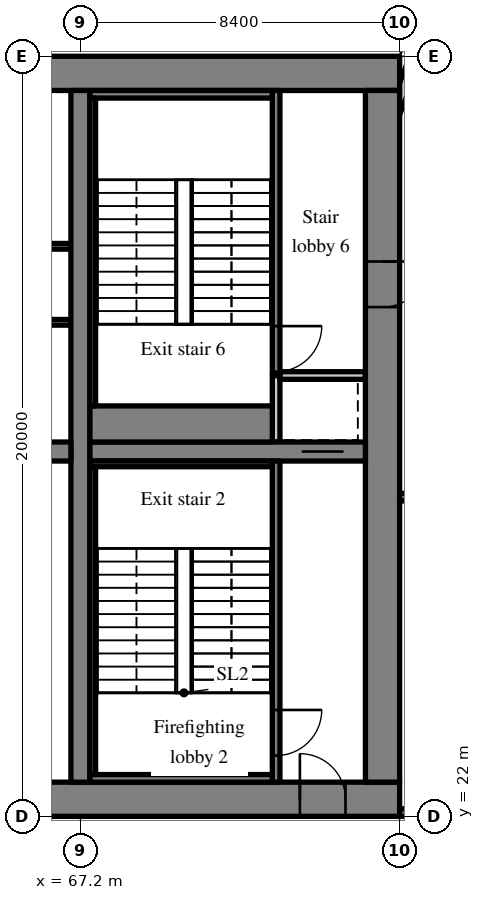
"""IFC4 building model, lengths in metres.
Left out: names, types, materials, properties, quantities, classifications, styles, units other than length and angle.
Written with IfcOpenShell. Run it as: python <this file> out.ifc"""

import sys

from ifc_helpers import new_model, si_unit, direction, frame, frame_2d, origin, place, context, subcontext, project, spatial, rectangle, extrude, source, transform, mapped, element, fill, save


model = new_model("IFC4")
c1 = context("Model", 3, precision=1e-05, world=origin(), true_north=direction((0.0, 1.0)))
c2 = subcontext(c1, "Body", "Model", "MODEL_VIEW")
j1 = project(units=[si_unit("LENGTHUNIT", "METRE"), si_unit("PLANEANGLEUNIT", "RADIAN")], contexts=[c1])
p1 = place(None, origin())
s1 = spatial("IfcSite", under=j1, at=p1, CompositionType="ELEMENT")
p2 = place(p1, origin())
s2 = spatial("IfcBuilding", under=s1, at=p2, CompositionType="ELEMENT")
p3 = place(p2, frame((0.0, 0.0, 99.0)))
s3 = spatial("IfcBuildingStorey", under=s2, at=p3, CompositionType="ELEMENT", Elevation=99.0)
m1 = source(origin(), c2, "Body", "SweptSolid", [
    extrude(rectangle(XDim=50.4, YDim=0.9, at=frame_2d((25.2, 0.0))), origin(), (0.0, 0.0, 1.0), 3.52),
])
p4 = place(p3, frame((25.2, 22.45, 0.0), z_axis=(0.0, 0.0, 1.0), x_axis=(1.0, 0.0, 0.0)))
e1 = element("IfcWall", 1, at=p4, inside=s3, PredefinedType="SHEAR", context=c2, shape_type="MappedRepresentation", body=[
    mapped(m1, transform((0.0, 0.0, 0.0), scale=1.0)),
])
m2 = source(origin(), c2, "Body", "SweptSolid", [
    extrude(rectangle(XDim=1.8, YDim=2.1, at=frame_2d((0.9, 1.05))), frame((0.0, 0.46, 0.0), z_axis=(0.0, -1.0, 0.0), x_axis=(1.0, 0.0, 0.0)), (0.0, 0.0, 1.0), 0.92),
])
p5 = place(p4, frame((15.9, 0.0, 0.0)))
e2 = element("IfcOpeningElement", 2, at=p5, cuts=e1, PredefinedType="OPENING", context=c2, shape_type="MappedRepresentation", body=[
    mapped(m2, transform((0.0, 0.0, 0.0), scale=1.0)),
])
m3 = source(origin(), c2, "Body", "SweptSolid", [
    extrude(rectangle(XDim=1.2, YDim=2.1, at=frame_2d((0.6, 1.05))), frame((0.0, 0.46, 0.0), z_axis=(0.0, -1.0, 0.0), x_axis=(1.0, 0.0, 0.0)), (0.0, 0.0, 1.0), 0.92),
])
p6 = place(p4, frame((26.975, 0.0, 0.0)))
e3 = element("IfcOpeningElement", 3, at=p6, cuts=e1, PredefinedType="OPENING", context=c2, shape_type="MappedRepresentation", body=[
    mapped(m3, transform((0.0, 0.0, 0.0), scale=1.0)),
])
m4 = source(origin(), c2, "Body", "SweptSolid", [
    extrude(rectangle(XDim=0.9, YDim=2.1, at=frame_2d((0.45, 1.05))), frame((0.0, 0.46, 0.0), z_axis=(0.0, -1.0, 0.0), x_axis=(1.0, 0.0, 0.0)), (0.0, 0.0, 1.0), 0.92),
])
p7 = place(p4, frame((32.25, 0.0, 0.0)))
e4 = element("IfcOpeningElement", 4, at=p7, cuts=e1, PredefinedType="OPENING", context=c2, shape_type="MappedRepresentation", body=[
    mapped(m4, transform((0.0, 0.0, 0.0), scale=1.0)),
])
p8 = place(p4, frame((38.275, 0.0, 0.0)))
e5 = element("IfcOpeningElement", 5, at=p8, cuts=e1, PredefinedType="OPENING", context=c2, shape_type="MappedRepresentation", body=[
    mapped(m4, transform((0.0, 0.0, 0.0), scale=1.0)),
])
p9 = place(p4, frame((6.45, 0.0, 0.0)))
e6 = element("IfcOpeningElement", 6, at=p9, cuts=e1, PredefinedType="OPENING", context=c2, shape_type="MappedRepresentation", body=[
    mapped(m3, transform((0.0, 0.0, 0.0), scale=1.0)),
])
p10 = place(p4, frame((47.775, 0.0, 0.0)))
e7 = element("IfcOpeningElement", 7, at=p10, cuts=e1, PredefinedType="OPENING", context=c2, shape_type="MappedRepresentation", body=[
    mapped(m3, transform((0.0, 0.0, 0.0), scale=1.0)),
])
p11 = place(p3, frame((25.2, 41.55, 0.0), z_axis=(0.0, 0.0, 1.0), x_axis=(1.0, 0.0, 0.0)))
e8 = element("IfcWall", 8, at=p11, inside=s3, PredefinedType="SHEAR", context=c2, shape_type="MappedRepresentation", body=[
    mapped(m1, transform((0.0, 0.0, 0.0), scale=1.0)),
])
m5 = source(origin(), c2, "Body", "SweptSolid", [
    extrude(rectangle(XDim=18.2, YDim=0.9, at=frame_2d((9.1, 0.0))), origin(), (0.0, 0.0, 1.0), 3.52),
])
p12 = place(p3, frame((75.15, 22.9, 0.0), z_axis=(0.0, 0.0, 1.0), x_axis=(0.0, 1.0, 0.0)))
e9 = element("IfcWall", 9, at=p12, inside=s3, PredefinedType="SHEAR", context=c2, shape_type="MappedRepresentation", body=[
    mapped(m5, transform((0.0, 0.0, 0.0), scale=1.0)),
])
p13 = place(p12, frame((12.5, 0.0, 0.0)))
e10 = element("IfcOpeningElement", 10, at=p13, cuts=e9, PredefinedType="OPENING", context=c2, shape_type="MappedRepresentation", body=[
    mapped(m3, transform((0.0, 0.0, 0.0), scale=1.0)),
])
m6 = source(origin(), c2, "Body", "SweptSolid", [
    extrude(rectangle(XDim=18.2, YDim=0.5, at=frame_2d((9.1, 0.0))), origin(), (0.0, 0.0, 1.0), 3.52),
])
p14 = place(p3, frame((67.2, 22.9, 0.0), z_axis=(0.0, 0.0, 1.0), x_axis=(0.0, 1.0, 0.0)))
e11 = element("IfcWall", 11, at=p14, inside=s3, PredefinedType="SHEAR", context=c2, shape_type="MappedRepresentation", body=[
    mapped(m6, transform((0.0, 0.0, 0.0), scale=1.0)),
])
m7 = source(origin(), c2, "Body", "SweptSolid", [
    extrude(rectangle(XDim=16.3, YDim=0.5, at=frame_2d((8.15, 0.0))), origin(), (0.0, 0.0, 1.0), 3.52),
])
p15 = place(p3, frame((50.65, 31.6, 0.0), z_axis=(0.0, 0.0, 1.0), x_axis=(1.0, 0.0, 0.0)))
e12 = element("IfcWall", 12, at=p15, inside=s3, PredefinedType="SHEAR", context=c2, shape_type="MappedRepresentation", body=[
    mapped(m7, transform((0.0, 0.0, 0.0), scale=1.0)),
])
m8 = source(origin(), c2, "Body", "SweptSolid", [
    extrude(rectangle(XDim=1.0, YDim=2.1, at=frame_2d((0.5, 1.05))), frame((0.0, 0.26, 0.0), z_axis=(0.0, -1.0, 0.0), x_axis=(1.0, 0.0, 0.0)), (0.0, 0.0, 1.0), 0.52),
])
p16 = place(p15, frame((0.575, 0.0, 0.0)))
e13 = element("IfcOpeningElement", 13, at=p16, cuts=e12, PredefinedType="OPENING", context=c2, shape_type="MappedRepresentation", body=[
    mapped(m8, transform((0.0, 0.0, 0.0), scale=1.0)),
])
m9 = source(origin(), c2, "Body", "SweptSolid", [
    extrude(rectangle(XDim=7.25, YDim=0.5, at=frame_2d((3.625, 0.0))), origin(), (0.0, 0.0, 1.0), 3.52),
])
p17 = place(p3, frame((67.45, 31.6, 0.0), z_axis=(0.0, 0.0, 1.0), x_axis=(1.0, 0.0, 0.0)))
e14 = element("IfcWall", 14, at=p17, inside=s3, PredefinedType="SHEAR", context=c2, shape_type="MappedRepresentation", body=[
    mapped(m9, transform((0.0, 0.0, 0.0), scale=1.0)),
])
m10 = source(origin(), c2, "Body", "SweptSolid", [
    extrude(rectangle(XDim=1.1, YDim=2.1, at=frame_2d((0.55, 1.05))), frame((0.0, 0.26, 0.0), z_axis=(0.0, -1.0, 0.0), x_axis=(1.0, 0.0, 0.0)), (0.0, 0.0, 1.0), 0.52),
])
p18 = place(p17, frame((5.575, 0.0, 0.0)))
e15 = element("IfcOpeningElement", 15, at=p18, cuts=e14, PredefinedType="OPENING", context=c2, shape_type="MappedRepresentation", body=[
    mapped(m10, transform((0.0, 0.0, 0.0), scale=1.0)),
])
m11 = source(origin(), c2, "Body", "SweptSolid", [
    extrude(rectangle(XDim=3.559, YDim=0.3, at=frame_2d((1.78, 0.0))), origin(), (0.0, 0.0, 1.0), 3.52),
])
p19 = place(p3, frame((76.523, 43.292, 0.0), z_axis=(0.0, 0.0, 1.0), x_axis=(-0.35779745313, -0.933799219604, 0.0)))
e16 = element("IfcWall", 16, at=p19, inside=s3, PredefinedType="SOLIDWALL", context=c2, shape_type="MappedRepresentation", body=[
    mapped(m11, transform((0.0, 0.0, 0.0), scale=1.0)),
])
m12 = source(origin(), c2, "Body", "SweptSolid", [
    extrude(rectangle(XDim=1.5, YDim=2.0, at=frame_2d((0.75, 1.0))), frame((0.0, 0.16, 0.0), z_axis=(0.0, -1.0, 0.0), x_axis=(1.0, 0.0, 0.0)), (0.0, 0.0, 1.0), 0.32),
])
p20 = place(p19, frame((0.156, 0.0, 0.9)))
e17 = element("IfcOpeningElement", 17, at=p20, cuts=e16, PredefinedType="OPENING", context=c2, shape_type="MappedRepresentation", body=[
    mapped(m12, transform((0.0, 0.0, 0.0), scale=1.0)),
])
m13 = source(origin(), c2, "Body", "SweptSolid", [
    extrude(rectangle(XDim=14.15, YDim=0.15, at=frame_2d((7.075, 0.0))), origin(), (0.0, 0.0, 1.0), 3.52),
])
p21 = place(p3, frame((66.95, 35.0, 0.0), z_axis=(0.0, 0.0, 1.0), x_axis=(-1.0, 0.0, 0.0)))
e18 = element("IfcWall", 18, at=p21, inside=s3, PredefinedType="PARTITIONING", context=c2, shape_type="MappedRepresentation", body=[
    mapped(m13, transform((0.0, 0.0, 0.0), scale=1.0)),
])
m14 = source(origin(), c2, "Body", "SweptSolid", [
    extrude(rectangle(XDim=0.9, YDim=2.1, at=frame_2d((0.45, 1.05))), frame((0.0, 0.085, 0.0), z_axis=(0.0, -1.0, 0.0), x_axis=(1.0, 0.0, 0.0)), (0.0, 0.0, 1.0), 0.17),
])
p22 = place(p21, frame((6.588, 0.0, 0.0)))
e19 = element("IfcOpeningElement", 19, at=p22, cuts=e18, PredefinedType="OPENING", context=c2, shape_type="MappedRepresentation", body=[
    mapped(m14, transform((0.0, 0.0, 0.0), scale=1.0)),
])
m15 = source(origin(), c2, "Body", "SweptSolid", [
    extrude(rectangle(XDim=16.3, YDim=0.15, at=frame_2d((8.15, 0.0))), origin(), (0.0, 0.0, 1.0), 3.52),
])
p23 = place(p3, frame((66.95, 37.0, 0.0), z_axis=(0.0, 0.0, 1.0), x_axis=(-1.0, 0.0, 0.0)))
e20 = element("IfcWall", 20, at=p23, inside=s3, PredefinedType="PARTITIONING", context=c2, shape_type="MappedRepresentation", body=[
    mapped(m15, transform((0.0, 0.0, 0.0), scale=1.0)),
])
p24 = place(p23, frame((3.218, 0.0, 0.0)))
e21 = element("IfcOpeningElement", 21, at=p24, cuts=e20, PredefinedType="OPENING", context=c2, shape_type="MappedRepresentation", body=[
    mapped(m14, transform((0.0, 0.0, 0.0), scale=1.0)),
])
p25 = place(p23, frame((8.108, 0.0, 0.0)))
e22 = element("IfcOpeningElement", 22, at=p25, cuts=e20, PredefinedType="OPENING", context=c2, shape_type="MappedRepresentation", body=[
    mapped(m14, transform((0.0, 0.0, 0.0), scale=1.0)),
])
p26 = place(p23, frame((11.368, 0.0, 0.0)))
e23 = element("IfcOpeningElement", 23, at=p26, cuts=e20, PredefinedType="OPENING", context=c2, shape_type="MappedRepresentation", body=[
    mapped(m14, transform((0.0, 0.0, 0.0), scale=1.0)),
])
p27 = place(p23, frame((14.627, 0.0, 0.0)))
e24 = element("IfcOpeningElement", 24, at=p27, cuts=e20, PredefinedType="OPENING", context=c2, shape_type="MappedRepresentation", body=[
    mapped(m14, transform((0.0, 0.0, 0.0), scale=1.0)),
])
m16 = source(origin(), c2, "Body", "SweptSolid", [
    extrude(rectangle(XDim=8.45, YDim=0.2, at=frame_2d((4.225, 0.0))), origin(), (0.0, 0.0, 1.0), 3.52),
])
p28 = place(p3, frame((72.35, 22.9, 0.0), z_axis=(0.0, 0.0, 1.0), x_axis=(0.0, 1.0, 0.0)))
e25 = element("IfcWall", 25, at=p28, inside=s3, PredefinedType="SOLIDWALL", context=c2, shape_type="MappedRepresentation", body=[
    mapped(m16, transform((0.0, 0.0, 0.0), scale=1.0)),
])
m17 = source(origin(), c2, "Body", "SweptSolid", [
    extrude(rectangle(XDim=1.2, YDim=2.1, at=frame_2d((0.6, 1.05))), frame((0.0, 0.11, 0.0), z_axis=(0.0, -1.0, 0.0), x_axis=(1.0, 0.0, 0.0)), (0.0, 0.0, 1.0), 0.22),
])
p29 = place(p28, frame((0.7, 0.0, 0.0)))
e26 = element("IfcOpeningElement", 26, at=p29, cuts=e25, PredefinedType="OPENING", context=c2, shape_type="MappedRepresentation", body=[
    mapped(m17, transform((0.0, 0.0, 0.0), scale=1.0)),
])
m18 = source(origin(), c2, "Body", "SweptSolid", [
    extrude(rectangle(XDim=1.75, YDim=0.2, at=frame_2d((0.875, 0.0))), origin(), (0.0, 0.0, 1.0), 3.52),
])
p30 = place(p3, frame((72.35, 31.85, 0.0), z_axis=(0.0, 0.0, 1.0), x_axis=(0.0, 1.0, 0.0)))
e27 = element("IfcWall", 27, at=p30, inside=s3, PredefinedType="SOLIDWALL", context=c2, shape_type="MappedRepresentation", body=[
    mapped(m18, transform((0.0, 0.0, 0.0), scale=1.0)),
])
m19 = source(origin(), c2, "Body", "SweptSolid", [
    extrude(rectangle(XDim=2.25, YDim=0.2, at=frame_2d((1.125, 0.0))), origin(), (0.0, 0.0, 1.0), 3.52),
])
p31 = place(p3, frame((72.45, 33.6, 0.0), z_axis=(0.0, 0.0, 1.0), x_axis=(1.0, 0.0, 0.0)))
e28 = element("IfcWall", 28, at=p31, inside=s3, PredefinedType="SOLIDWALL", context=c2, shape_type="MappedRepresentation", body=[
    mapped(m19, transform((0.0, 0.0, 0.0), scale=1.0)),
])
m20 = source(origin(), c2, "Body", "SweptSolid", [
    extrude(rectangle(XDim=7.5, YDim=0.2, at=frame_2d((3.75, 0.0))), origin(), (0.0, 0.0, 1.0), 3.52),
])
p32 = place(p3, frame((72.35, 33.6, 0.0), z_axis=(0.0, 0.0, 1.0), x_axis=(0.0, 1.0, 0.0)))
e29 = element("IfcWall", 29, at=p32, inside=s3, PredefinedType="SOLIDWALL", context=c2, shape_type="MappedRepresentation", body=[
    mapped(m20, transform((0.0, 0.0, 0.0), scale=1.0)),
])
p33 = place(p32, frame((0.1, 0.0, 0.0)))
e30 = element("IfcOpeningElement", 30, at=p33, cuts=e29, PredefinedType="OPENING", context=c2, shape_type="MappedRepresentation", body=[
    mapped(m17, transform((0.0, 0.0, 0.0), scale=1.0)),
])
m21 = source(origin(), c2, "Body", "SweptSolid", [
    extrude(rectangle(XDim=8.225, YDim=0.2, at=frame_2d((4.112, 0.0))), origin(), (0.0, 0.0, 1.0), 3.52),
])
p34 = place(p3, frame((83.825, 22.1, 0.0), z_axis=(0.0, 0.0, 1.0), x_axis=(-1.0, 0.0, 0.0)))
e31 = element("IfcWall", 31, at=p34, inside=s3, PredefinedType="SOLIDWALL", context=c2, shape_type="MappedRepresentation", body=[
    mapped(m21, transform((0.0, 0.0, 0.0), scale=1.0)),
])
p35 = place(p34, frame((6.025, 0.0, 0.0)))
e32 = element("IfcOpeningElement", 32, at=p35, cuts=e31, PredefinedType="OPENING", context=c2, shape_type="MappedRepresentation", body=[
    mapped(m17, transform((0.0, 0.0, 0.0), scale=1.0)),
])
p36 = place(p3, frame((83.825, 30.4, 0.0), z_axis=(0.0, 0.0, 1.0), x_axis=(-1.0, 0.0, 0.0)))
e33 = element("IfcWall", 33, at=p36, inside=s3, PredefinedType="SOLIDWALL", context=c2, shape_type="MappedRepresentation", body=[
    mapped(m21, transform((0.0, 0.0, 0.0), scale=1.0)),
])
m22 = source(origin(), c2, "Body", "SweptSolid", [
    extrude(rectangle(XDim=1.0, YDim=2.1, at=frame_2d((0.5, 1.05))), frame((0.0, 0.11, 0.0), z_axis=(0.0, -1.0, 0.0), x_axis=(1.0, 0.0, 0.0)), (0.0, 0.0, 1.0), 0.22),
])
p37 = place(p36, frame((6.125, 0.0, 0.0)))
e34 = element("IfcOpeningElement", 34, at=p37, cuts=e33, PredefinedType="OPENING", context=c2, shape_type="MappedRepresentation", body=[
    mapped(m22, transform((0.0, 0.0, 0.0), scale=1.0)),
])
m23 = source(origin(), c2, "Body", "SweptSolid", [
    extrude(rectangle(XDim=4.8, YDim=0.2, at=frame_2d((2.4, 0.0))), origin(), (0.0, 0.0, 1.0), 3.52),
])
p38 = place(p3, frame((67.45, 23.0, 0.0), z_axis=(0.0, 0.0, 1.0), x_axis=(1.0, 0.0, 0.0)))
e35 = element("IfcWall", 35, at=p38, inside=s3, PredefinedType="SOLIDWALL", context=c2, shape_type="MappedRepresentation", body=[
    mapped(m23, transform((0.0, 0.0, 0.0), scale=1.0)),
])
m24 = source(origin(), c2, "Body", "SweptSolid", [
    extrude(rectangle(XDim=4.8, YDim=0.15, at=frame_2d((2.4, 0.0))), origin(), (0.0, 0.0, 1.0), 3.52),
])
p39 = place(p3, frame((67.45, 31.275, 0.0), z_axis=(0.0, 0.0, 1.0), x_axis=(1.0, 0.0, 0.0)))
e36 = element("IfcWall", 36, at=p39, inside=s3, PredefinedType="SOLIDWALL", context=c2, shape_type="MappedRepresentation", body=[
    mapped(m24, transform((0.0, 0.0, 0.0), scale=1.0)),
])
m25 = source(origin(), c2, "Body", "SweptSolid", [
    extrude(rectangle(XDim=8.1, YDim=0.15, at=frame_2d((4.05, 0.0))), origin(), (0.0, 0.0, 1.0), 3.52),
])
p40 = place(p3, frame((67.525, 23.1, 0.0), z_axis=(0.0, 0.0, 1.0), x_axis=(0.0, 1.0, 0.0)))
e37 = element("IfcWall", 37, at=p40, inside=s3, PredefinedType="SOLIDWALL", context=c2, shape_type="MappedRepresentation", body=[
    mapped(m25, transform((0.0, 0.0, 0.0), scale=1.0)),
])
p41 = place(p3, frame((67.45, 41.0, 0.0), z_axis=(0.0, 0.0, 1.0), x_axis=(1.0, 0.0, 0.0)))
e38 = element("IfcWall", 38, at=p41, inside=s3, PredefinedType="SOLIDWALL", context=c2, shape_type="MappedRepresentation", body=[
    mapped(m23, transform((0.0, 0.0, 0.0), scale=1.0)),
])
m26 = source(origin(), c2, "Body", "SweptSolid", [
    extrude(rectangle(XDim=4.8, YDim=0.95, at=frame_2d((2.4, 0.0))), origin(), (0.0, 0.0, 1.0), 3.52),
])
p42 = place(p3, frame((67.45, 32.325, 0.0), z_axis=(0.0, 0.0, 1.0), x_axis=(1.0, 0.0, 0.0)))
e39 = element("IfcWall", 39, at=p42, inside=s3, PredefinedType="SOLIDWALL", context=c2, shape_type="MappedRepresentation", body=[
    mapped(m26, transform((0.0, 0.0, 0.0), scale=1.0)),
])
p43 = place(p3, frame((67.525, 32.8, 0.0), z_axis=(0.0, 0.0, 1.0), x_axis=(0.0, 1.0, 0.0)))
e40 = element("IfcWall", 40, at=p43, inside=s3, PredefinedType="SOLIDWALL", context=c2, shape_type="MappedRepresentation", body=[
    mapped(m25, transform((0.0, 0.0, 0.0), scale=1.0)),
])
m27 = source(origin(), c2, "Body", "SweptSolid", [
    extrude(rectangle(XDim=1.2, YDim=2.1, at=frame_2d((0.6, 1.05))), frame((0.0, 0.025, 0.0), z_axis=(0.0, -1.0, 0.0), x_axis=(1.0, 0.0, 0.0)), (0.0, 0.0, 1.0), 0.05),
])
p44 = place(p29, origin())
e41 = element("IfcDoor", 41, at=p44, inside=s3, OperationType="SINGLE_SWING_RIGHT", PredefinedType="DOOR", context=c2, shape_type="MappedRepresentation", body=[
    mapped(m27, transform((0.0, 0.0, 0.0), scale=1.0)),
])
fill(e26, e41)
m28 = source(origin(), c2, "Body", "SweptSolid", [
    extrude(rectangle(XDim=1.2, YDim=2.1, at=frame_2d((0.6, 1.05))), frame((0.0, 0.375, 0.0), z_axis=(0.0, -1.0, 0.0), x_axis=(1.0, 0.0, 0.0)), (0.0, 0.0, 1.0), 0.05),
])
p45 = place(p10, origin())
e42 = element("IfcDoor", 42, at=p45, inside=s3, OperationType="SINGLE_SWING_LEFT", PredefinedType="DOOR", context=c2, shape_type="MappedRepresentation", body=[
    mapped(m28, transform((0.0, 0.0, 0.0), scale=1.0)),
])
fill(e7, e42)
m29 = source(origin(), c2, "Body", "SweptSolid", [
    extrude(rectangle(XDim=1.1, YDim=2.1, at=frame_2d((0.55, 1.05))), frame((0.0, 0.025, 0.0), z_axis=(0.0, -1.0, 0.0), x_axis=(1.0, 0.0, 0.0)), (0.0, 0.0, 1.0), 0.05),
])
p46 = place(p18, origin())
e43 = element("IfcDoor", 43, at=p46, inside=s3, OperationType="SLIDING_TO_RIGHT", PredefinedType="DOOR", context=c2, shape_type="MappedRepresentation", body=[
    mapped(m29, transform((0.0, 0.0, 0.0), scale=1.0)),
])
fill(e15, e43)
p47 = place(p33, origin())
e44 = element("IfcDoor", 44, at=p47, inside=s3, OperationType="SINGLE_SWING_RIGHT", PredefinedType="DOOR", context=c2, shape_type="MappedRepresentation", body=[
    mapped(m27, transform((0.0, 0.0, 0.0), scale=1.0)),
])
fill(e30, e44)
p48 = place(p13, origin())
e45 = element("IfcDoor", 45, at=p48, inside=s3, OperationType="SINGLE_SWING_RIGHT", PredefinedType="DOOR", context=c2, shape_type="MappedRepresentation", body=[
    mapped(m27, transform((0.0, 0.0, 0.0), scale=1.0)),
])
fill(e10, e45)
save(model, sys.argv[1])
